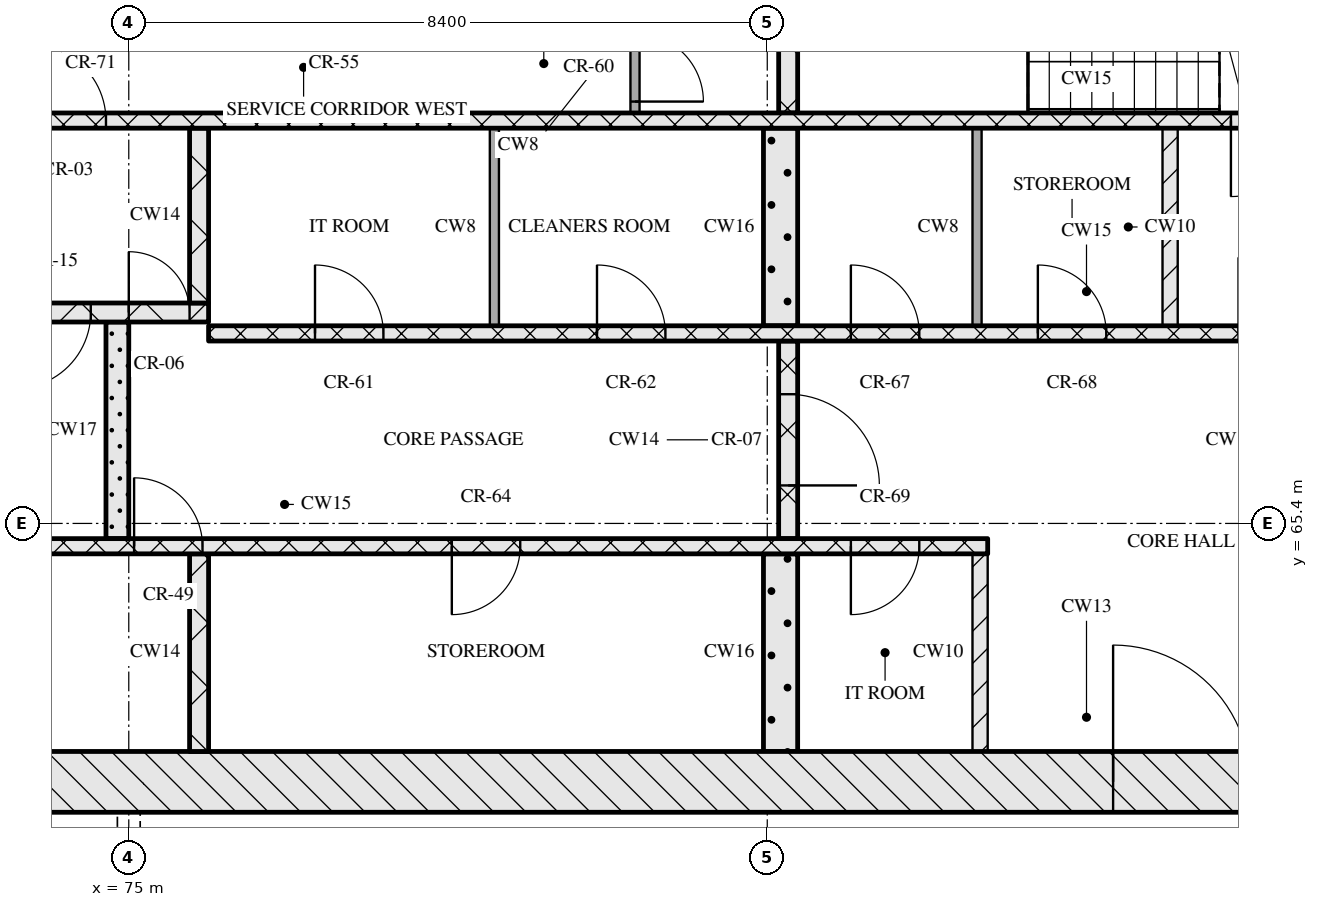
"""IFC4 building model, lengths in metres.
Left out: names, types, materials, properties, quantities, classifications, styles, units other than length and angle.
Written with IfcOpenShell. Run it as: python <this file> out.ifc"""

import sys

from ifc_helpers import new_model, si_unit, direction, frame, frame_2d, origin, place, context, subcontext, project, spatial, rectangle, extrude, element, fill, save


model = new_model("IFC4")
c1 = context("Model", 3, precision=1e-05, world=origin(), true_north=direction((0.0, 1.0)))
c2 = subcontext(c1, "Body", "Model", "MODEL_VIEW")
j1 = project(units=[si_unit("LENGTHUNIT", "METRE"), si_unit("PLANEANGLEUNIT", "RADIAN")], contexts=[c1])
p1 = place(None, origin())
s1 = spatial("IfcSite", under=j1, at=p1, CompositionType="ELEMENT")
p2 = place(p1, origin())
s2 = spatial("IfcBuilding", under=s1, at=p2, CompositionType="ELEMENT")
p3 = place(p2, frame((0.0, 0.0, 154.65)))
s3 = spatial("IfcBuildingStorey", under=s2, at=p3, CompositionType="ELEMENT", Elevation=154.65)
p4 = place(p3, frame((67.0, 62.0, 0.0), z_axis=(0.0, 0.0, 1.0), x_axis=(1.0, 0.0, 0.0)))
e1 = element("IfcWall", 1, at=p4, inside=s3, PredefinedType="SOLIDWALL", context=c2, shape_type="SweptSolid", body=[
    extrude(rectangle(XDim=41.2, YDim=0.8, at=frame_2d((20.6, 0.0))), origin(), (0.0, 0.0, 1.0), 3.32),
])
p5 = place(p4, frame((20.95, 0.0, 0.0)))
e2 = element("IfcOpeningElement", 2, at=p5, cuts=e1, PredefinedType="OPENING", context=c2, shape_type="SweptSolid", body=[
    extrude(rectangle(XDim=1.8, YDim=2.1, at=frame_2d((0.9, 1.05))), frame((0.0, 0.41, 0.0), z_axis=(0.0, -1.0, 0.0), x_axis=(1.0, 0.0, 0.0)), (0.0, 0.0, 1.0), 0.82),
])
p6 = place(p3, frame((75.925, 62.4, 0.0), z_axis=(0.0, 0.0, 1.0), x_axis=(0.0, 1.0, 0.0)))
e3 = element("IfcWall", 3, at=p6, inside=s3, PredefinedType="SOLIDWALL", context=c2, shape_type="SweptSolid", body=[
    extrude(rectangle(XDim=2.6, YDim=0.25, at=frame_2d((1.3, 0.0))), origin(), (0.0, 0.0, 1.0), 3.32),
])
p7 = place(p3, frame((83.575, 62.4, 0.0), z_axis=(0.0, 0.0, 1.0), x_axis=(0.0, 1.0, 0.0)))
e4 = element("IfcWall", 4, at=p7, inside=s3, PredefinedType="SOLIDWALL", context=c2, shape_type="SweptSolid", body=[
    extrude(rectangle(XDim=2.6, YDim=0.45, at=frame_2d((1.3, 0.0))), origin(), (0.0, 0.0, 1.0), 3.32),
])
p8 = place(p3, frame((86.2, 62.4, 0.0), z_axis=(0.0, 0.0, 1.0), x_axis=(0.0, 1.0, 0.0)))
e5 = element("IfcWall", 5, at=p8, inside=s3, PredefinedType="PARTITIONING", context=c2, shape_type="SweptSolid", body=[
    extrude(rectangle(XDim=2.6, YDim=0.2, at=frame_2d((1.3, 0.0))), origin(), (0.0, 0.0, 1.0), 3.32),
])
p9 = place(p3, frame((67.8, 65.1, 0.0), z_axis=(0.0, 0.0, 1.0), x_axis=(1.0, 0.0, 0.0)))
e6 = element("IfcWall", 6, at=p9, inside=s3, PredefinedType="SOLIDWALL", context=c2, shape_type="SweptSolid", body=[
    extrude(rectangle(XDim=18.5, YDim=0.2, at=frame_2d((9.25, 0.0))), origin(), (0.0, 0.0, 1.0), 3.32),
])
p10 = place(p9, frame((7.27, 0.0, 0.0)))
e7 = element("IfcOpeningElement", 7, at=p10, cuts=e6, PredefinedType="OPENING", context=c2, shape_type="SweptSolid", body=[
    extrude(rectangle(XDim=0.9, YDim=2.1, at=frame_2d((0.45, 1.05))), frame((0.0, 0.11, 0.0), z_axis=(0.0, -1.0, 0.0), x_axis=(1.0, 0.0, 0.0)), (0.0, 0.0, 1.0), 0.22),
])
p11 = place(p9, frame((11.45, 0.0, 0.0)))
e8 = element("IfcOpeningElement", 8, at=p11, cuts=e6, PredefinedType="OPENING", context=c2, shape_type="SweptSolid", body=[
    extrude(rectangle(XDim=0.9, YDim=2.1, at=frame_2d((0.45, 1.05))), frame((0.0, 0.11, 0.0), z_axis=(0.0, -1.0, 0.0), x_axis=(1.0, 0.0, 0.0)), (0.0, 0.0, 1.0), 0.22),
])
p12 = place(p9, frame((16.7, 0.0, 0.0)))
e9 = element("IfcOpeningElement", 9, at=p12, cuts=e6, PredefinedType="OPENING", context=c2, shape_type="SweptSolid", body=[
    extrude(rectangle(XDim=0.9, YDim=2.1, at=frame_2d((0.45, 1.05))), frame((0.0, 0.11, 0.0), z_axis=(0.0, -1.0, 0.0), x_axis=(1.0, 0.0, 0.0)), (0.0, 0.0, 1.0), 0.22),
])
p13 = place(p3, frame((74.85, 65.2, 0.0), z_axis=(0.0, 0.0, 1.0), x_axis=(0.0, 1.0, 0.0)))
e10 = element("IfcWall", 10, at=p13, inside=s3, PredefinedType="SOLIDWALL", context=c2, shape_type="SweptSolid", body=[
    extrude(rectangle(XDim=2.85, YDim=0.3, at=frame_2d((1.425, 0.0))), origin(), (0.0, 0.0, 1.0), 3.32),
])
p14 = place(p3, frame((83.675, 65.2, 0.0), z_axis=(0.0, 0.0, 1.0), x_axis=(0.0, 1.0, 0.0)))
e11 = element("IfcWall", 11, at=p14, inside=s3, PredefinedType="SOLIDWALL", context=c2, shape_type="SweptSolid", body=[
    extrude(rectangle(XDim=2.6, YDim=0.25, at=frame_2d((1.3, 0.0))), origin(), (0.0, 0.0, 1.0), 3.32),
])
p15 = place(p14, frame((0.7, 0.0, 0.0)))
e12 = element("IfcOpeningElement", 12, at=p15, cuts=e11, PredefinedType="OPENING", context=c2, shape_type="SweptSolid", body=[
    extrude(rectangle(XDim=1.2, YDim=2.1, at=frame_2d((0.6, 1.05))), frame((0.0, 0.135, 0.0), z_axis=(0.0, -1.0, 0.0), x_axis=(1.0, 0.0, 0.0)), (0.0, 0.0, 1.0), 0.27),
])
p16 = place(p3, frame((76.05, 67.9, 0.0), z_axis=(0.0, 0.0, 1.0), x_axis=(1.0, 0.0, 0.0)))
e13 = element("IfcWall", 13, at=p16, inside=s3, PredefinedType="SOLIDWALL", context=c2, shape_type="SweptSolid", body=[
    extrude(rectangle(XDim=23.1, YDim=0.2, at=frame_2d((11.55, 0.0))), origin(), (0.0, 0.0, 1.0), 3.32),
])
p17 = place(p16, frame((1.4, 0.0, 0.0)))
e14 = element("IfcOpeningElement", 14, at=p17, cuts=e13, PredefinedType="OPENING", context=c2, shape_type="SweptSolid", body=[
    extrude(rectangle(XDim=0.9, YDim=2.1, at=frame_2d((0.45, 1.05))), frame((0.0, 0.11, 0.0), z_axis=(0.0, -1.0, 0.0), x_axis=(1.0, 0.0, 0.0)), (0.0, 0.0, 1.0), 0.22),
])
p18 = place(p16, frame((5.11, 0.0, 0.0)))
e15 = element("IfcOpeningElement", 15, at=p18, cuts=e13, PredefinedType="OPENING", context=c2, shape_type="SweptSolid", body=[
    extrude(rectangle(XDim=0.9, YDim=2.1, at=frame_2d((0.45, 1.05))), frame((0.0, 0.11, 0.0), z_axis=(0.0, -1.0, 0.0), x_axis=(1.0, 0.0, 0.0)), (0.0, 0.0, 1.0), 0.22),
])
p19 = place(p16, frame((8.45, 0.0, 0.0)))
e16 = element("IfcOpeningElement", 16, at=p19, cuts=e13, PredefinedType="OPENING", context=c2, shape_type="SweptSolid", body=[
    extrude(rectangle(XDim=0.9, YDim=2.1, at=frame_2d((0.45, 1.05))), frame((0.0, 0.11, 0.0), z_axis=(0.0, -1.0, 0.0), x_axis=(1.0, 0.0, 0.0)), (0.0, 0.0, 1.0), 0.22),
])
p20 = place(p16, frame((10.91, 0.0, 0.0)))
e17 = element("IfcOpeningElement", 17, at=p20, cuts=e13, PredefinedType="OPENING", context=c2, shape_type="SweptSolid", body=[
    extrude(rectangle(XDim=0.9, YDim=2.1, at=frame_2d((0.45, 1.05))), frame((0.0, 0.11, 0.0), z_axis=(0.0, -1.0, 0.0), x_axis=(1.0, 0.0, 0.0)), (0.0, 0.0, 1.0), 0.22),
])
p21 = place(p16, frame((13.55, 0.0, 0.0)))
e18 = element("IfcOpeningElement", 18, at=p21, cuts=e13, PredefinedType="OPENING", context=c2, shape_type="SweptSolid", body=[
    extrude(rectangle(XDim=1.0, YDim=2.1, at=frame_2d((0.5, 1.05))), frame((0.0, 0.11, 0.0), z_axis=(0.0, -1.0, 0.0), x_axis=(1.0, 0.0, 0.0)), (0.0, 0.0, 1.0), 0.22),
])
p22 = place(p16, frame((16.2, 0.0, 0.0)))
e19 = element("IfcOpeningElement", 19, at=p22, cuts=e13, PredefinedType="OPENING", context=c2, shape_type="SweptSolid", body=[
    extrude(rectangle(XDim=1.1, YDim=2.1, at=frame_2d((0.55, 1.05))), frame((0.0, 0.11, 0.0), z_axis=(0.0, -1.0, 0.0), x_axis=(1.0, 0.0, 0.0)), (0.0, 0.0, 1.0), 0.22),
])
p23 = place(p16, frame((18.7, 0.0, 0.0)))
e20 = element("IfcOpeningElement", 20, at=p23, cuts=e13, PredefinedType="OPENING", context=c2, shape_type="SweptSolid", body=[
    extrude(rectangle(XDim=1.1, YDim=2.1, at=frame_2d((0.55, 1.05))), frame((0.0, 0.11, 0.0), z_axis=(0.0, -1.0, 0.0), x_axis=(1.0, 0.0, 0.0)), (0.0, 0.0, 1.0), 0.22),
])
p24 = place(p16, frame((21.2, 0.0, 0.0)))
e21 = element("IfcOpeningElement", 21, at=p24, cuts=e13, PredefinedType="OPENING", context=c2, shape_type="SweptSolid", body=[
    extrude(rectangle(XDim=1.1, YDim=2.1, at=frame_2d((0.55, 1.05))), frame((0.0, 0.11, 0.0), z_axis=(0.0, -1.0, 0.0), x_axis=(1.0, 0.0, 0.0)), (0.0, 0.0, 1.0), 0.22),
])
p25 = place(p3, frame((79.81, 68.0, 0.0), z_axis=(0.0, 0.0, 1.0), x_axis=(0.0, 1.0, 0.0)))
e22 = element("IfcWall", 22, at=p25, inside=s3, PredefinedType="PARTITIONING", context=c2, shape_type="SweptSolid", body=[
    extrude(rectangle(XDim=2.6, YDim=0.12, at=frame_2d((1.3, 0.0))), origin(), (0.0, 0.0, 1.0), 3.32),
])
p26 = place(p3, frame((83.575, 68.0, 0.0), z_axis=(0.0, 0.0, 1.0), x_axis=(0.0, 1.0, 0.0)))
e23 = element("IfcWall", 23, at=p26, inside=s3, PredefinedType="SOLIDWALL", context=c2, shape_type="SweptSolid", body=[
    extrude(rectangle(XDim=2.6, YDim=0.45, at=frame_2d((1.3, 0.0))), origin(), (0.0, 0.0, 1.0), 3.32),
])
p27 = place(p3, frame((86.16, 68.0, 0.0), z_axis=(0.0, 0.0, 1.0), x_axis=(0.0, 1.0, 0.0)))
e24 = element("IfcWall", 24, at=p27, inside=s3, PredefinedType="PARTITIONING", context=c2, shape_type="SweptSolid", body=[
    extrude(rectangle(XDim=2.6, YDim=0.12, at=frame_2d((1.3, 0.0))), origin(), (0.0, 0.0, 1.0), 3.32),
])
p28 = place(p3, frame((88.7, 68.0, 0.0), z_axis=(0.0, 0.0, 1.0), x_axis=(0.0, 1.0, 0.0)))
e25 = element("IfcWall", 25, at=p28, inside=s3, PredefinedType="PARTITIONING", context=c2, shape_type="SweptSolid", body=[
    extrude(rectangle(XDim=2.6, YDim=0.2, at=frame_2d((1.3, 0.0))), origin(), (0.0, 0.0, 1.0), 3.32),
])
p29 = place(p3, frame((67.8, 68.175, 0.0), z_axis=(0.0, 0.0, 1.0), x_axis=(1.0, 0.0, 0.0)))
e26 = element("IfcWall", 26, at=p29, inside=s3, PredefinedType="SOLIDWALL", context=c2, shape_type="SweptSolid", body=[
    extrude(rectangle(XDim=8.25, YDim=0.25, at=frame_2d((4.125, 0.0))), origin(), (0.0, 0.0, 1.0), 3.32),
])
p30 = place(p29, frame((5.7, 0.0, 0.0)))
e27 = element("IfcOpeningElement", 27, at=p30, cuts=e26, PredefinedType="OPENING", context=c2, shape_type="SweptSolid", body=[
    extrude(rectangle(XDim=1.0, YDim=2.1, at=frame_2d((0.5, 1.05))), frame((0.0, 0.135, 0.0), z_axis=(0.0, -1.0, 0.0), x_axis=(1.0, 0.0, 0.0)), (0.0, 0.0, 1.0), 0.27),
])
p31 = place(p29, frame((7.2, 0.0, 0.0)))
e28 = element("IfcOpeningElement", 28, at=p31, cuts=e26, PredefinedType="OPENING", context=c2, shape_type="SweptSolid", body=[
    extrude(rectangle(XDim=0.8, YDim=2.1, at=frame_2d((0.4, 1.05))), frame((0.0, 0.135, 0.0), z_axis=(0.0, -1.0, 0.0), x_axis=(1.0, 0.0, 0.0)), (0.0, 0.0, 1.0), 0.27),
])
p32 = place(p3, frame((75.925, 68.3, 0.0), z_axis=(0.0, 0.0, 1.0), x_axis=(0.0, 1.0, 0.0)))
e29 = element("IfcWall", 29, at=p32, inside=s3, PredefinedType="SOLIDWALL", context=c2, shape_type="SweptSolid", body=[
    extrude(rectangle(XDim=2.3, YDim=0.25, at=frame_2d((1.15, 0.0))), origin(), (0.0, 0.0, 1.0), 3.32),
])
p33 = place(p3, frame((67.8, 70.7, 0.0), z_axis=(0.0, 0.0, 1.0), x_axis=(1.0, 0.0, 0.0)))
e30 = element("IfcWall", 30, at=p33, inside=s3, PredefinedType="SOLIDWALL", context=c2, shape_type="SweptSolid", body=[
    extrude(rectangle(XDim=39.6, YDim=0.2, at=frame_2d((19.8, 0.0))), origin(), (0.0, 0.0, 1.0), 3.32),
])
p34 = place(p33, frame((0.65, 0.0, 0.0)))
e31 = element("IfcOpeningElement", 31, at=p34, cuts=e30, PredefinedType="OPENING", context=c2, shape_type="SweptSolid", body=[
    extrude(rectangle(XDim=1.1, YDim=2.1, at=frame_2d((0.55, 1.05))), frame((0.0, 0.11, 0.0), z_axis=(0.0, -1.0, 0.0), x_axis=(1.0, 0.0, 0.0)), (0.0, 0.0, 1.0), 0.22),
])
p35 = place(p33, frame((3.25, 0.0, 0.0)))
e32 = element("IfcOpeningElement", 32, at=p35, cuts=e30, PredefinedType="OPENING", context=c2, shape_type="SweptSolid", body=[
    extrude(rectangle(XDim=1.1, YDim=2.1, at=frame_2d((0.55, 1.05))), frame((0.0, 0.11, 0.0), z_axis=(0.0, -1.0, 0.0), x_axis=(1.0, 0.0, 0.0)), (0.0, 0.0, 1.0), 0.22),
])
p36 = place(p33, frame((5.9, 0.0, 0.0)))
e33 = element("IfcOpeningElement", 33, at=p36, cuts=e30, PredefinedType="OPENING", context=c2, shape_type="SweptSolid", body=[
    extrude(rectangle(XDim=1.0, YDim=2.1, at=frame_2d((0.5, 1.05))), frame((0.0, 0.11, 0.0), z_axis=(0.0, -1.0, 0.0), x_axis=(1.0, 0.0, 0.0)), (0.0, 0.0, 1.0), 0.22),
])
p37 = place(p33, frame((21.7, 0.0, 0.0)))
e34 = element("IfcOpeningElement", 34, at=p37, cuts=e30, PredefinedType="OPENING", context=c2, shape_type="SweptSolid", body=[
    extrude(rectangle(XDim=1.0, YDim=2.1, at=frame_2d((0.5, 1.05))), frame((0.0, 0.11, 0.0), z_axis=(0.0, -1.0, 0.0), x_axis=(1.0, 0.0, 0.0)), (0.0, 0.0, 1.0), 0.22),
])
p38 = place(p33, frame((32.7, 0.0, 0.0)))
e35 = element("IfcOpeningElement", 35, at=p38, cuts=e30, PredefinedType="OPENING", context=c2, shape_type="SweptSolid", body=[
    extrude(rectangle(XDim=1.0, YDim=2.1, at=frame_2d((0.5, 1.05))), frame((0.0, 0.11, 0.0), z_axis=(0.0, -1.0, 0.0), x_axis=(1.0, 0.0, 0.0)), (0.0, 0.0, 1.0), 0.22),
])
p39 = place(p33, frame((35.25, 0.0, 0.0)))
e36 = element("IfcOpeningElement", 36, at=p39, cuts=e30, PredefinedType="OPENING", context=c2, shape_type="SweptSolid", body=[
    extrude(rectangle(XDim=1.1, YDim=2.1, at=frame_2d((0.55, 1.05))), frame((0.0, 0.11, 0.0), z_axis=(0.0, -1.0, 0.0), x_axis=(1.0, 0.0, 0.0)), (0.0, 0.0, 1.0), 0.22),
])
p40 = place(p33, frame((37.85, 0.0, 0.0)))
e37 = element("IfcOpeningElement", 37, at=p40, cuts=e30, PredefinedType="OPENING", context=c2, shape_type="SweptSolid", body=[
    extrude(rectangle(XDim=1.1, YDim=2.1, at=frame_2d((0.55, 1.05))), frame((0.0, 0.11, 0.0), z_axis=(0.0, -1.0, 0.0), x_axis=(1.0, 0.0, 0.0)), (0.0, 0.0, 1.0), 0.22),
])
p41 = place(p3, frame((81.66, 70.8, 0.0), z_axis=(0.0, 0.0, 1.0), x_axis=(0.0, 1.0, 0.0)))
e38 = element("IfcWall", 38, at=p41, inside=s3, PredefinedType="PARTITIONING", context=c2, shape_type="SweptSolid", body=[
    extrude(rectangle(XDim=1.2, YDim=0.12, at=frame_2d((0.6, 0.0))), origin(), (0.0, 0.0, 1.0), 3.32),
])
p42 = place(p41, frame((0.15, 0.0, 0.0)))
e39 = element("IfcOpeningElement", 39, at=p42, cuts=e38, PredefinedType="OPENING", context=c2, shape_type="SweptSolid", body=[
    extrude(rectangle(XDim=0.9, YDim=2.1, at=frame_2d((0.45, 1.05))), frame((0.0, 0.07, 0.0), z_axis=(0.0, -1.0, 0.0), x_axis=(1.0, 0.0, 0.0)), (0.0, 0.0, 1.0), 0.14),
])
p43 = place(p3, frame((83.675, 70.8, 0.0), z_axis=(0.0, 0.0, 1.0), x_axis=(0.0, 1.0, 0.0)))
e40 = element("IfcWall", 40, at=p43, inside=s3, PredefinedType="SOLIDWALL", context=c2, shape_type="SweptSolid", body=[
    extrude(rectangle(XDim=2.95, YDim=0.25, at=frame_2d((1.475, 0.0))), origin(), (0.0, 0.0, 1.0), 3.32),
])
p44 = place(p5, origin())
e41 = element("IfcDoor", 41, at=p44, inside=s3, OperationType="DOUBLE_DOOR_SINGLE_SWING", PredefinedType="DOOR", context=c2, shape_type="SweptSolid", body=[
    extrude(rectangle(XDim=1.8, YDim=2.1, at=frame_2d((0.9, 1.05))), frame((0.0, 0.025, 0.0), z_axis=(0.0, -1.0, 0.0), x_axis=(1.0, 0.0, 0.0)), (0.0, 0.0, 1.0), 0.05),
])
fill(e2, e41)
p45 = place(p10, origin())
e42 = element("IfcDoor", 42, at=p45, inside=s3, OperationType="SINGLE_SWING_LEFT", PredefinedType="DOOR", context=c2, shape_type="SweptSolid", body=[
    extrude(rectangle(XDim=0.9, YDim=2.1, at=frame_2d((0.45, 1.05))), frame((0.0, 0.025, 0.0), z_axis=(0.0, -1.0, 0.0), x_axis=(1.0, 0.0, 0.0)), (0.0, 0.0, 1.0), 0.05),
])
fill(e7, e42)
p46 = place(p11, origin())
e43 = element("IfcDoor", 43, at=p46, inside=s3, OperationType="SINGLE_SWING_RIGHT", PredefinedType="DOOR", context=c2, shape_type="SweptSolid", body=[
    extrude(rectangle(XDim=0.9, YDim=2.1, at=frame_2d((0.45, 1.05))), frame((0.0, 0.025, 0.0), z_axis=(0.0, -1.0, 0.0), x_axis=(1.0, 0.0, 0.0)), (0.0, 0.0, 1.0), 0.05),
])
fill(e8, e43)
p47 = place(p12, origin())
e44 = element("IfcDoor", 44, at=p47, inside=s3, OperationType="SINGLE_SWING_RIGHT", PredefinedType="DOOR", context=c2, shape_type="SweptSolid", body=[
    extrude(rectangle(XDim=0.9, YDim=2.1, at=frame_2d((0.45, 1.05))), frame((0.0, 0.025, 0.0), z_axis=(0.0, -1.0, 0.0), x_axis=(1.0, 0.0, 0.0)), (0.0, 0.0, 1.0), 0.05),
])
fill(e9, e44)
p48 = place(p15, origin())
e45 = element("IfcDoor", 45, at=p48, inside=s3, OperationType="SINGLE_SWING_RIGHT", PredefinedType="DOOR", context=c2, shape_type="SweptSolid", body=[
    extrude(rectangle(XDim=1.2, YDim=2.1, at=frame_2d((0.6, 1.05))), frame((0.0, 0.025, 0.0), z_axis=(0.0, -1.0, 0.0), x_axis=(1.0, 0.0, 0.0)), (0.0, 0.0, 1.0), 0.05),
])
fill(e12, e45)
p49 = place(p17, origin())
e46 = element("IfcDoor", 46, at=p49, inside=s3, OperationType="SINGLE_SWING_LEFT", PredefinedType="DOOR", context=c2, shape_type="SweptSolid", body=[
    extrude(rectangle(XDim=0.9, YDim=2.1, at=frame_2d((0.45, 1.05))), frame((0.0, 0.025, 0.0), z_axis=(0.0, -1.0, 0.0), x_axis=(1.0, 0.0, 0.0)), (0.0, 0.0, 1.0), 0.05),
])
fill(e14, e46)
p50 = place(p18, origin())
e47 = element("IfcDoor", 47, at=p50, inside=s3, OperationType="SINGLE_SWING_LEFT", PredefinedType="DOOR", context=c2, shape_type="SweptSolid", body=[
    extrude(rectangle(XDim=0.9, YDim=2.1, at=frame_2d((0.45, 1.05))), frame((0.0, 0.025, 0.0), z_axis=(0.0, -1.0, 0.0), x_axis=(1.0, 0.0, 0.0)), (0.0, 0.0, 1.0), 0.05),
])
fill(e15, e47)
p51 = place(p19, origin())
e48 = element("IfcDoor", 48, at=p51, inside=s3, OperationType="SINGLE_SWING_LEFT", PredefinedType="DOOR", context=c2, shape_type="SweptSolid", body=[
    extrude(rectangle(XDim=0.9, YDim=2.1, at=frame_2d((0.45, 1.05))), frame((0.0, 0.025, 0.0), z_axis=(0.0, -1.0, 0.0), x_axis=(1.0, 0.0, 0.0)), (0.0, 0.0, 1.0), 0.05),
])
fill(e16, e48)
p52 = place(p20, origin())
e49 = element("IfcDoor", 49, at=p52, inside=s3, OperationType="SINGLE_SWING_LEFT", PredefinedType="DOOR", context=c2, shape_type="SweptSolid", body=[
    extrude(rectangle(XDim=0.9, YDim=2.1, at=frame_2d((0.45, 1.05))), frame((0.0, 0.025, 0.0), z_axis=(0.0, -1.0, 0.0), x_axis=(1.0, 0.0, 0.0)), (0.0, 0.0, 1.0), 0.05),
])
fill(e17, e49)
p53 = place(p30, origin())
e50 = element("IfcDoor", 50, at=p53, inside=s3, OperationType="SINGLE_SWING_RIGHT", PredefinedType="DOOR", context=c2, shape_type="SweptSolid", body=[
    extrude(rectangle(XDim=1.0, YDim=2.1, at=frame_2d((0.5, 1.05))), frame((0.0, 0.025, 0.0), z_axis=(0.0, -1.0, 0.0), x_axis=(1.0, 0.0, 0.0)), (0.0, 0.0, 1.0), 0.05),
])
fill(e27, e50)
p54 = place(p31, origin())
e51 = element("IfcDoor", 51, at=p54, inside=s3, OperationType="SINGLE_SWING_LEFT", PredefinedType="DOOR", context=c2, shape_type="SweptSolid", body=[
    extrude(rectangle(XDim=0.8, YDim=2.1, at=frame_2d((0.4, 1.05))), frame((0.0, 0.025, 0.0), z_axis=(0.0, -1.0, 0.0), x_axis=(1.0, 0.0, 0.0)), (0.0, 0.0, 1.0), 0.05),
])
fill(e28, e51)
p55 = place(p36, origin())
e52 = element("IfcDoor", 52, at=p55, inside=s3, OperationType="SINGLE_SWING_LEFT", PredefinedType="DOOR", context=c2, shape_type="SweptSolid", body=[
    extrude(rectangle(XDim=1.0, YDim=2.1, at=frame_2d((0.5, 1.05))), frame((0.0, 0.025, 0.0), z_axis=(0.0, -1.0, 0.0), x_axis=(1.0, 0.0, 0.0)), (0.0, 0.0, 1.0), 0.05),
])
fill(e33, e52)
p56 = place(p37, origin())
e53 = element("IfcDoor", 53, at=p56, inside=s3, OperationType="SINGLE_SWING_RIGHT", PredefinedType="DOOR", context=c2, shape_type="SweptSolid", body=[
    extrude(rectangle(XDim=1.0, YDim=2.1, at=frame_2d((0.5, 1.05))), frame((0.0, 0.025, 0.0), z_axis=(0.0, -1.0, 0.0), x_axis=(1.0, 0.0, 0.0)), (0.0, 0.0, 1.0), 0.05),
])
fill(e34, e53)
p57 = place(p42, origin())
e54 = element("IfcDoor", 54, at=p57, inside=s3, OperationType="SINGLE_SWING_RIGHT", PredefinedType="DOOR", context=c2, shape_type="SweptSolid", body=[
    extrude(rectangle(XDim=0.9, YDim=2.1, at=frame_2d((0.45, 1.05))), frame((0.0, 0.025, 0.0), z_axis=(0.0, -1.0, 0.0), x_axis=(1.0, 0.0, 0.0)), (0.0, 0.0, 1.0), 0.05),
])
fill(e39, e54)
save(model, sys.argv[1])
